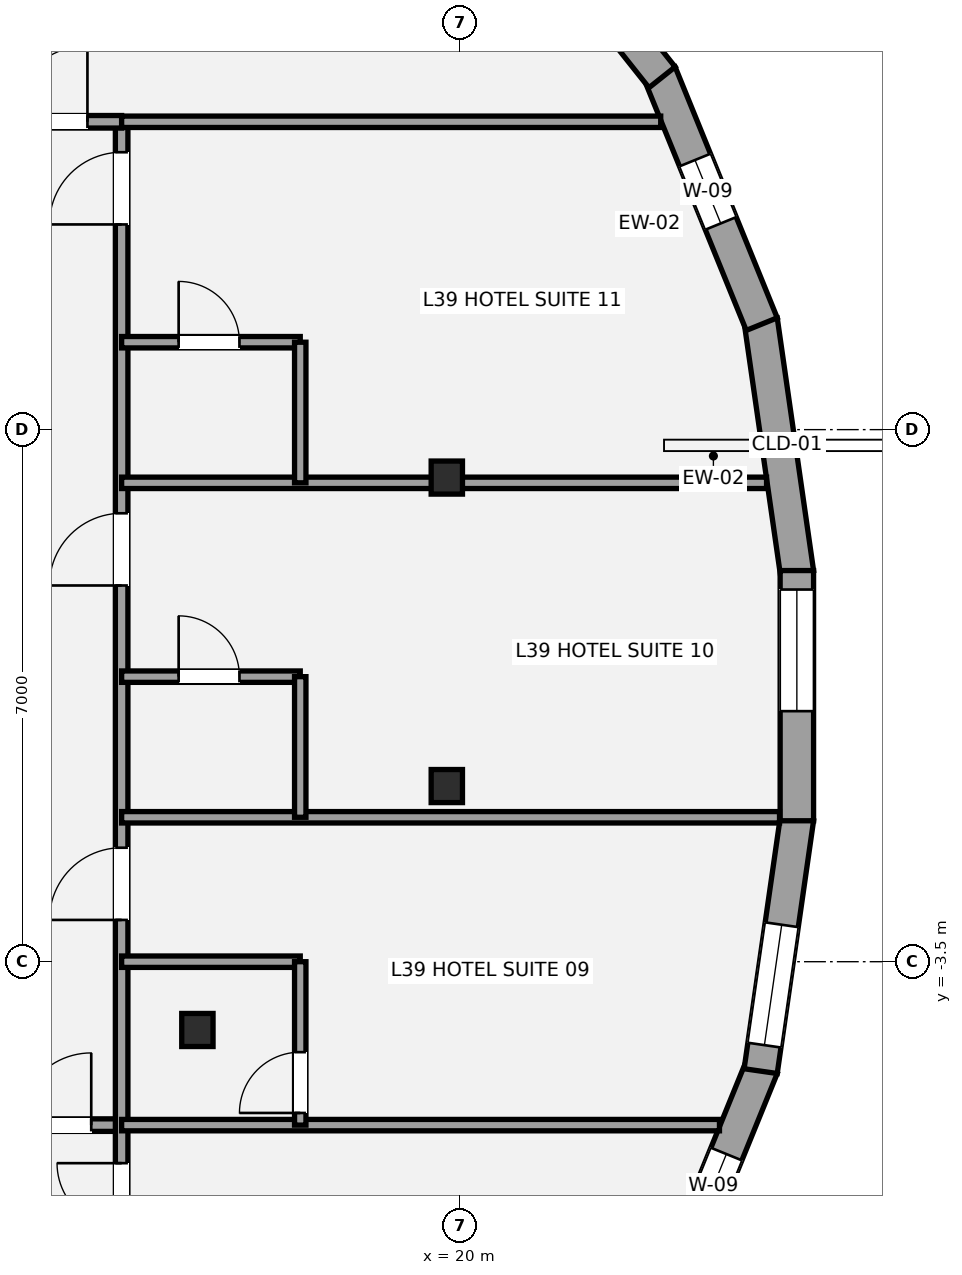
"""IFC4 building model, lengths in metres.
Left out: names, types, materials, properties, quantities, classifications, styles, units other than length and angle.
Written with IfcOpenShell. Run it as: python <this file> out.ifc"""

import sys

from ifc_helpers import new_model, si_unit, direction, frame, frame_2d, origin, origin_2d, place, context, subcontext, project, spatial, rectangle, i_section, extrude, element, fill, save


model = new_model("IFC4")
c1 = context("Model", 3, precision=1e-05, world=origin(), true_north=direction((0.0, 1.0)))
c2 = subcontext(c1, "Body", "Model", "MODEL_VIEW")
j1 = project(units=[si_unit("LENGTHUNIT", "METRE"), si_unit("PLANEANGLEUNIT", "RADIAN")], contexts=[c1])
p1 = place(None, origin())
s1 = spatial("IfcSite", under=j1, at=p1, CompositionType="ELEMENT")
p2 = place(p1, origin())
s2 = spatial("IfcBuilding", under=s1, at=p2, CompositionType="ELEMENT")
p3 = place(p2, frame((0.0, 0.0, 147.0)))
s3 = spatial("IfcBuildingStorey", under=s2, at=p3, CompositionType="ELEMENT", Elevation=147.0)
for number, where, z_axis, x_axis in (
    (1, (19.828, 2.869, 0.0), (0.0, 0.0, 1.0), (1.0, 0.0, 0.0)),
    (2, (16.547, -4.398, 0.0), (0.0, 0.0, 1.0), (1.0, 0.0, 0.0)),
    (3, (19.828, -1.189, 0.0), (0.0, 0.0, 1.0), (1.0, 0.0, 0.0)),
):
    element("IfcColumn", number, at=place(p3, frame(where, z_axis=z_axis, x_axis=x_axis)), inside=s3, PredefinedType="COLUMN", context=c2, shape_type="SweptSolid", body=[
        extrude(i_section(OverallWidth=0.412, OverallDepth=0.435, WebThickness=0.036, FlangeThickness=0.057, at=origin_2d()), origin(), (0.0, 0.0, 1.0), 3.2),
    ])
p4 = place(p3, frame((23.958, 4.94, 0.0), z_axis=(0.0, 0.0, 1.0), x_axis=(0.142296299692, -0.989824107149, 0.0)))
e4 = element("IfcWall", 4, at=p4, inside=s3, PredefinedType="STANDARD", context=c2, shape_type="SweptSolid", body=[
    extrude(rectangle(XDim=3.359, YDim=0.44, at=frame_2d((1.68, 0.0))), origin(), (0.0, 0.0, 1.0), 2.315),
])
p5 = place(p3, frame((22.629, 8.189, 0.0), z_axis=(0.0, 0.0, 1.0), x_axis=(0.376863872061, -0.926268655378, 0.0)))
e5 = element("IfcWall", 5, at=p5, inside=s3, PredefinedType="STANDARD", context=c2, shape_type="SweptSolid", body=[
    extrude(rectangle(XDim=3.564, YDim=0.44, at=frame_2d((1.782, 0.0))), origin(), (0.0, 0.0, 1.0), 2.315),
])
p6 = place(p5, frame((1.234, 0.0, 0.58)))
e6 = element("IfcOpeningElement", 6, at=p6, cuts=e5, PredefinedType="OPENING", context=c2, shape_type="SweptSolid", body=[
    extrude(rectangle(XDim=0.9, YDim=1.35, at=frame_2d((0.45, 0.675))), frame((0.0, 0.23, 0.0), z_axis=(0.0, -1.0, 0.0), x_axis=(1.0, 0.0, 0.0)), (0.0, 0.0, 1.0), 0.46),
])
p7 = place(p3, frame((20.22, 11.207, 0.0), z_axis=(0.0, 0.0, 1.0), x_axis=(0.622149266174, -0.782898646441, 0.0)))
e7 = element("IfcWall", 7, at=p7, inside=s3, PredefinedType="STANDARD", context=c2, shape_type="SweptSolid", body=[
    extrude(rectangle(XDim=3.923, YDim=0.44, at=frame_2d((1.961, 0.0))), origin(), (0.0, 0.0, 1.0), 2.315),
])
p8 = place(p7, frame((1.531, 0.0, 0.58)))
e8 = element("IfcOpeningElement", 8, at=p8, cuts=e7, PredefinedType="OPENING", context=c2, shape_type="SweptSolid", body=[
    extrude(rectangle(XDim=1.6, YDim=1.55, at=frame_2d((0.8, 0.775))), frame((0.0, 0.23, 0.0), z_axis=(0.0, -1.0, 0.0), x_axis=(1.0, 0.0, 0.0)), (0.0, 0.0, 1.0), 0.46),
])
p9 = place(p3, frame((23.972, -4.888, 0.0), z_axis=(0.0, 0.0, 1.0), x_axis=(-0.376863872061, -0.926268655378, 0.0)))
e9 = element("IfcWall", 9, at=p9, inside=s3, PredefinedType="STANDARD", context=c2, shape_type="SweptSolid", body=[
    extrude(rectangle(XDim=3.564, YDim=0.44, at=frame_2d((1.782, 0.0))), origin(), (0.0, 0.0, 1.0), 2.315),
])
p10 = place(p9, frame((1.234, 0.0, 0.58)))
e10 = element("IfcOpeningElement", 10, at=p10, cuts=e9, PredefinedType="OPENING", context=c2, shape_type="SweptSolid", body=[
    extrude(rectangle(XDim=0.9, YDim=1.35, at=frame_2d((0.45, 0.675))), frame((0.0, 0.23, 0.0), z_axis=(0.0, -1.0, 0.0), x_axis=(1.0, 0.0, 0.0)), (0.0, 0.0, 1.0), 0.46),
])
p11 = place(p3, frame((24.436, -1.615, 0.0), z_axis=(0.0, 0.0, 1.0), x_axis=(-0.142296299692, -0.989824107149, 0.0)))
e11 = element("IfcWall", 11, at=p11, inside=s3, PredefinedType="STANDARD", context=c2, shape_type="SweptSolid", body=[
    extrude(rectangle(XDim=3.359, YDim=0.44, at=frame_2d((1.68, 0.0))), origin(), (0.0, 0.0, 1.0), 2.315),
])
p12 = place(p11, frame((1.414, 0.0, 0.58)))
e12 = element("IfcOpeningElement", 12, at=p12, cuts=e11, PredefinedType="OPENING", context=c2, shape_type="SweptSolid", body=[
    extrude(rectangle(XDim=1.6, YDim=1.55, at=frame_2d((0.8, 0.775))), frame((0.0, 0.23, 0.0), z_axis=(0.0, -1.0, 0.0), x_axis=(1.0, 0.0, 0.0)), (0.0, 0.0, 1.0), 0.46),
])
p13 = place(p3, frame((24.434, 1.646, 0.0), z_axis=(0.0, 0.0, 1.0), x_axis=(0.0, -1.0, 0.0)))
e13 = element("IfcWall", 13, at=p13, inside=s3, PredefinedType="STANDARD", context=c2, shape_type="SweptSolid", body=[
    extrude(rectangle(XDim=3.292, YDim=0.44, at=frame_2d((1.646, 0.0))), origin(), (0.0, 0.0, 1.0), 2.315),
])
p14 = place(p13, frame((0.25, 0.0, 0.58)))
e14 = element("IfcOpeningElement", 14, at=p14, cuts=e13, PredefinedType="OPENING", context=c2, shape_type="SweptSolid", body=[
    extrude(rectangle(XDim=1.6, YDim=1.55, at=frame_2d((0.8, 0.775))), frame((0.0, 0.23, 0.0), z_axis=(0.0, -1.0, 0.0), x_axis=(1.0, 0.0, 0.0)), (0.0, 0.0, 1.0), 0.46),
])
p15 = place(p3, frame((-15.55, -5.65, 0.0), z_axis=(0.0, 0.0, 1.0), x_axis=(1.0, 0.0, 0.0)))
e15 = element("IfcWall", 15, at=p15, inside=s3, PredefinedType="PARTITIONING", context=c2, shape_type="SweptSolid", body=[
    extrude(rectangle(XDim=31.1, YDim=0.165, at=frame_2d((15.55, 0.0))), origin(), (0.0, 0.0, 1.0), 2.398),
])
p16 = place(p15, frame((4.6, 0.0, 0.0)))
e16 = element("IfcOpeningElement", 16, at=p16, cuts=e15, PredefinedType="OPENING", context=c2, shape_type="SweptSolid", body=[
    extrude(rectangle(XDim=0.95, YDim=2.15, at=frame_2d((0.475, 1.075))), frame((0.0, 0.093, 0.0), z_axis=(0.0, -1.0, 0.0), x_axis=(1.0, 0.0, 0.0)), (0.0, 0.0, 1.0), 0.185),
])
p17 = place(p15, frame((11.0, 0.0, 0.0)))
e17 = element("IfcOpeningElement", 17, at=p17, cuts=e15, PredefinedType="OPENING", context=c2, shape_type="SweptSolid", body=[
    extrude(rectangle(XDim=0.95, YDim=2.15, at=frame_2d((0.475, 1.075))), frame((0.0, 0.093, 0.0), z_axis=(0.0, -1.0, 0.0), x_axis=(1.0, 0.0, 0.0)), (0.0, 0.0, 1.0), 0.185),
])
p18 = place(p15, frame((17.4, 0.0, 0.0)))
e18 = element("IfcOpeningElement", 18, at=p18, cuts=e15, PredefinedType="OPENING", context=c2, shape_type="SweptSolid", body=[
    extrude(rectangle(XDim=0.95, YDim=2.15, at=frame_2d((0.475, 1.075))), frame((0.0, 0.093, 0.0), z_axis=(0.0, -1.0, 0.0), x_axis=(1.0, 0.0, 0.0)), (0.0, 0.0, 1.0), 0.185),
])
p19 = place(p15, frame((23.8, 0.0, 0.0)))
e19 = element("IfcOpeningElement", 19, at=p19, cuts=e15, PredefinedType="OPENING", context=c2, shape_type="SweptSolid", body=[
    extrude(rectangle(XDim=0.95, YDim=2.15, at=frame_2d((0.475, 1.075))), frame((0.0, 0.093, 0.0), z_axis=(0.0, -1.0, 0.0), x_axis=(1.0, 0.0, 0.0)), (0.0, 0.0, 1.0), 0.185),
])
p20 = place(p15, frame((29.75, 0.0, 0.0)))
e20 = element("IfcOpeningElement", 20, at=p20, cuts=e15, PredefinedType="OPENING", context=c2, shape_type="SweptSolid", body=[
    extrude(rectangle(XDim=0.95, YDim=2.15, at=frame_2d((0.475, 1.075))), frame((0.0, 0.093, 0.0), z_axis=(0.0, -1.0, 0.0), x_axis=(1.0, 0.0, 0.0)), (0.0, 0.0, 1.0), 0.185),
])
p21 = place(p3, frame((15.55, -13.778, 0.0), z_axis=(0.0, 0.0, 1.0), x_axis=(0.0, 1.0, 0.0)))
e21 = element("IfcWall", 21, at=p21, inside=s3, PredefinedType="PARTITIONING", context=c2, shape_type="SweptSolid", body=[
    extrude(rectangle(XDim=21.328, YDim=0.165, at=frame_2d((10.664, 0.0))), origin(), (0.0, 0.0, 1.0), 2.473),
])
p22 = place(p21, frame((6.777, 0.0, 0.0)))
e22 = element("IfcOpeningElement", 22, at=p22, cuts=e21, PredefinedType="OPENING", context=c2, shape_type="SweptSolid", body=[
    extrude(rectangle(XDim=0.85, YDim=2.1, at=frame_2d((0.425, 1.05))), frame((0.0, 0.093, 0.0), z_axis=(0.0, -1.0, 0.0), x_axis=(1.0, 0.0, 0.0)), (0.0, 0.0, 1.0), 0.185),
])
p23 = place(p21, frame((10.827, 0.0, 0.0)))
e23 = element("IfcOpeningElement", 23, at=p23, cuts=e21, PredefinedType="OPENING", context=c2, shape_type="SweptSolid", body=[
    extrude(rectangle(XDim=0.95, YDim=2.15, at=frame_2d((0.475, 1.075))), frame((0.0, 0.093, 0.0), z_axis=(0.0, -1.0, 0.0), x_axis=(1.0, 0.0, 0.0)), (0.0, 0.0, 1.0), 0.185),
])
p24 = place(p21, frame((15.227, 0.0, 0.0)))
e24 = element("IfcOpeningElement", 24, at=p24, cuts=e21, PredefinedType="OPENING", context=c2, shape_type="SweptSolid", body=[
    extrude(rectangle(XDim=0.95, YDim=2.15, at=frame_2d((0.475, 1.075))), frame((0.0, 0.093, 0.0), z_axis=(0.0, -1.0, 0.0), x_axis=(1.0, 0.0, 0.0)), (0.0, 0.0, 1.0), 0.185),
])
p25 = place(p21, frame((19.977, 0.0, 0.0)))
e25 = element("IfcOpeningElement", 25, at=p25, cuts=e21, PredefinedType="OPENING", context=c2, shape_type="SweptSolid", body=[
    extrude(rectangle(XDim=0.95, YDim=2.15, at=frame_2d((0.475, 1.075))), frame((0.0, 0.093, 0.0), z_axis=(0.0, -1.0, 0.0), x_axis=(1.0, 0.0, 0.0)), (0.0, 0.0, 1.0), 0.185),
])
p26 = place(p3, frame((13.8, 7.55, 0.0), z_axis=(0.0, 0.0, 1.0), x_axis=(1.0, 0.0, 0.0)))
e26 = element("IfcWall", 26, at=p26, inside=s3, PredefinedType="PARTITIONING", context=c2, shape_type="SweptSolid", body=[
    extrude(rectangle(XDim=1.75, YDim=0.165, at=frame_2d((0.875, 0.0))), origin(), (0.0, 0.0, 1.0), 2.473),
])
p27 = place(p26, frame((0.3, 0.0, 0.0)))
e27 = element("IfcOpeningElement", 27, at=p27, cuts=e26, PredefinedType="OPENING", context=c2, shape_type="SweptSolid", body=[
    extrude(rectangle(XDim=1.0, YDim=2.15, at=frame_2d((0.5, 1.075))), frame((0.0, 0.093, 0.0), z_axis=(0.0, -1.0, 0.0), x_axis=(1.0, 0.0, 0.0)), (0.0, 0.0, 1.0), 0.185),
])
p28 = place(p3, frame((15.55, 7.55, 0.0), z_axis=(0.0, 0.0, 1.0), x_axis=(1.0, 0.0, 0.0)))
e28 = element("IfcWall", 28, at=p28, inside=s3, PredefinedType="PLUMBINGWALL", context=c2, shape_type="SweptSolid", body=[
    extrude(rectangle(XDim=7.093, YDim=0.15, at=frame_2d((3.546, 0.0))), origin(), (0.0, 0.0, 1.0), 2.473),
])
p29 = place(p3, frame((15.55, -5.65, 0.0), z_axis=(0.0, 0.0, 1.0), x_axis=(1.0, 0.0, 0.0)))
e29 = element("IfcWall", 29, at=p29, inside=s3, PredefinedType="PLUMBINGWALL", context=c2, shape_type="SweptSolid", body=[
    extrude(rectangle(XDim=7.866, YDim=0.15, at=frame_2d((3.933, 0.0))), origin(), (0.0, 0.0, 1.0), 2.473),
])
p30 = place(p3, frame((15.55, -1.6, 0.0), z_axis=(0.0, 0.0, 1.0), x_axis=(1.0, 0.0, 0.0)))
e30 = element("IfcWall", 30, at=p30, inside=s3, PredefinedType="PLUMBINGWALL", context=c2, shape_type="SweptSolid", body=[
    extrude(rectangle(XDim=8.656, YDim=0.15, at=frame_2d((4.328, 0.0))), origin(), (0.0, 0.0, 1.0), 2.398),
])
p31 = place(p3, frame((15.55, 2.8, 0.0), z_axis=(0.0, 0.0, 1.0), x_axis=(1.0, 0.0, 0.0)))
e31 = element("IfcWall", 31, at=p31, inside=s3, PredefinedType="PLUMBINGWALL", context=c2, shape_type="SweptSolid", body=[
    extrude(rectangle(XDim=8.485, YDim=0.15, at=frame_2d((4.243, 0.0))), origin(), (0.0, 0.0, 1.0), 2.473),
])
p32 = place(p3, frame((15.55, -3.5, 0.0), z_axis=(0.0, 0.0, 1.0), x_axis=(1.0, 0.0, 0.0)))
e32 = element("IfcWall", 32, at=p32, inside=s3, PredefinedType="PLUMBINGWALL", context=c2, shape_type="SweptSolid", body=[
    extrude(rectangle(XDim=2.35, YDim=0.15, at=frame_2d((1.175, 0.0))), origin(), (0.0, 0.0, 1.0), 2.398),
])
p33 = place(p3, frame((17.9, -5.65, 0.0), z_axis=(0.0, 0.0, 1.0), x_axis=(0.0, 1.0, 0.0)))
e33 = element("IfcWall", 33, at=p33, inside=s3, PredefinedType="PLUMBINGWALL", context=c2, shape_type="SweptSolid", body=[
    extrude(rectangle(XDim=2.15, YDim=0.15, at=frame_2d((1.075, 0.0))), origin(), (0.0, 0.0, 1.0), 2.473),
])
p34 = place(p33, frame((0.16, 0.0, 0.0)))
e34 = element("IfcOpeningElement", 34, at=p34, cuts=e33, PredefinedType="OPENING", context=c2, shape_type="SweptSolid", body=[
    extrude(rectangle(XDim=0.8, YDim=2.1, at=frame_2d((0.4, 1.05))), frame((0.0, 0.085, 0.0), z_axis=(0.0, -1.0, 0.0), x_axis=(1.0, 0.0, 0.0)), (0.0, 0.0, 1.0), 0.17),
])
p35 = place(p3, frame((15.55, 0.25, 0.0), z_axis=(0.0, 0.0, 1.0), x_axis=(1.0, 0.0, 0.0)))
e35 = element("IfcWall", 35, at=p35, inside=s3, PredefinedType="PLUMBINGWALL", context=c2, shape_type="SweptSolid", body=[
    extrude(rectangle(XDim=2.35, YDim=0.15, at=frame_2d((1.175, 0.0))), origin(), (0.0, 0.0, 1.0), 2.473),
])
p36 = place(p35, frame((0.75, 0.0, 0.0)))
e36 = element("IfcOpeningElement", 36, at=p36, cuts=e35, PredefinedType="OPENING", context=c2, shape_type="SweptSolid", body=[
    extrude(rectangle(XDim=0.8, YDim=2.1, at=frame_2d((0.4, 1.05))), frame((0.0, 0.085, 0.0), z_axis=(0.0, -1.0, 0.0), x_axis=(1.0, 0.0, 0.0)), (0.0, 0.0, 1.0), 0.17),
])
p37 = place(p3, frame((17.9, -1.6, 0.0), z_axis=(0.0, 0.0, 1.0), x_axis=(0.0, 1.0, 0.0)))
e37 = element("IfcWall", 37, at=p37, inside=s3, PredefinedType="PLUMBINGWALL", context=c2, shape_type="SweptSolid", body=[
    extrude(rectangle(XDim=1.85, YDim=0.15, at=frame_2d((0.925, 0.0))), origin(), (0.0, 0.0, 1.0), 3.02),
])
p38 = place(p3, frame((15.55, 4.65, 0.0), z_axis=(0.0, 0.0, 1.0), x_axis=(1.0, 0.0, 0.0)))
e38 = element("IfcWall", 38, at=p38, inside=s3, PredefinedType="PLUMBINGWALL", context=c2, shape_type="SweptSolid", body=[
    extrude(rectangle(XDim=2.35, YDim=0.15, at=frame_2d((1.175, 0.0))), origin(), (0.0, 0.0, 1.0), 2.473),
])
p39 = place(p38, frame((0.75, 0.0, 0.0)))
e39 = element("IfcOpeningElement", 39, at=p39, cuts=e38, PredefinedType="OPENING", context=c2, shape_type="SweptSolid", body=[
    extrude(rectangle(XDim=0.8, YDim=2.1, at=frame_2d((0.4, 1.05))), frame((0.0, 0.085, 0.0), z_axis=(0.0, -1.0, 0.0), x_axis=(1.0, 0.0, 0.0)), (0.0, 0.0, 1.0), 0.17),
])
p40 = place(p3, frame((17.9, 2.8, 0.0), z_axis=(0.0, 0.0, 1.0), x_axis=(0.0, 1.0, 0.0)))
e40 = element("IfcWall", 40, at=p40, inside=s3, PredefinedType="PLUMBINGWALL", context=c2, shape_type="SweptSolid", body=[
    extrude(rectangle(XDim=1.85, YDim=0.15, at=frame_2d((0.925, 0.0))), origin(), (0.0, 0.0, 1.0), 3.02),
])
p41 = place(p6, origin())
e41 = element("IfcWindow", 41, at=p41, inside=s3, PartitioningType="SINGLE_PANEL", PredefinedType="WINDOW", context=c2, shape_type="SweptSolid", body=[
    extrude(rectangle(XDim=0.9, YDim=1.35, at=frame_2d((0.45, 0.675))), frame((0.0, -0.01, 0.0), z_axis=(0.0, -1.0, 0.0), x_axis=(1.0, 0.0, 0.0)), (0.0, 0.0, 1.0), 0.06),
])
fill(e6, e41)
p42 = place(p10, origin())
e42 = element("IfcWindow", 42, at=p42, inside=s3, PartitioningType="SINGLE_PANEL", PredefinedType="WINDOW", context=c2, shape_type="SweptSolid", body=[
    extrude(rectangle(XDim=0.9, YDim=1.35, at=frame_2d((0.45, 0.675))), frame((0.0, -0.01, 0.0), z_axis=(0.0, -1.0, 0.0), x_axis=(1.0, 0.0, 0.0)), (0.0, 0.0, 1.0), 0.06),
])
fill(e10, e42)
p43 = place(p12, origin())
e43 = element("IfcWindow", 43, at=p43, inside=s3, PartitioningType="SINGLE_PANEL", PredefinedType="WINDOW", context=c2, shape_type="SweptSolid", body=[
    extrude(rectangle(XDim=1.6, YDim=1.55, at=frame_2d((0.8, 0.775))), frame((0.0, -0.01, 0.0), z_axis=(0.0, -1.0, 0.0), x_axis=(1.0, 0.0, 0.0)), (0.0, 0.0, 1.0), 0.06),
])
fill(e12, e43)
p44 = place(p14, origin())
e44 = element("IfcWindow", 44, at=p44, inside=s3, PartitioningType="SINGLE_PANEL", PredefinedType="WINDOW", context=c2, shape_type="SweptSolid", body=[
    extrude(rectangle(XDim=1.6, YDim=1.55, at=frame_2d((0.8, 0.775))), frame((0.0, -0.01, 0.0), z_axis=(0.0, -1.0, 0.0), x_axis=(1.0, 0.0, 0.0)), (0.0, 0.0, 1.0), 0.06),
])
fill(e14, e44)
p45 = place(p27, origin())
e45 = element("IfcDoor", 45, at=p45, inside=s3, OperationType="SINGLE_SWING_RIGHT", PredefinedType="DOOR", context=c2, shape_type="SweptSolid", body=[
    extrude(rectangle(XDim=1.0, YDim=2.15, at=frame_2d((0.5, 1.075))), frame((0.0, 0.025, 0.0), z_axis=(0.0, -1.0, 0.0), x_axis=(1.0, 0.0, 0.0)), (0.0, 0.0, 1.0), 0.05),
])
fill(e27, e45)
p46 = place(p22, origin())
e46 = element("IfcDoor", 46, at=p46, inside=s3, OperationType="SINGLE_SWING_RIGHT", PredefinedType="DOOR", context=c2, shape_type="SweptSolid", body=[
    extrude(rectangle(XDim=0.85, YDim=2.1, at=frame_2d((0.425, 1.05))), frame((0.0, 0.025, 0.0), z_axis=(0.0, -1.0, 0.0), x_axis=(1.0, 0.0, 0.0)), (0.0, 0.0, 1.0), 0.05),
])
fill(e22, e46)
p47 = place(p20, origin())
e47 = element("IfcDoor", 47, at=p47, inside=s3, OperationType="SINGLE_SWING_RIGHT", PredefinedType="DOOR", context=c2, shape_type="SweptSolid", body=[
    extrude(rectangle(XDim=0.95, YDim=2.15, at=frame_2d((0.475, 1.075))), frame((0.0, 0.025, 0.0), z_axis=(0.0, -1.0, 0.0), x_axis=(1.0, 0.0, 0.0)), (0.0, 0.0, 1.0), 0.05),
])
fill(e20, e47)
p48 = place(p23, origin())
e48 = element("IfcDoor", 48, at=p48, inside=s3, OperationType="SINGLE_SWING_LEFT", PredefinedType="DOOR", context=c2, shape_type="SweptSolid", body=[
    extrude(rectangle(XDim=0.95, YDim=2.15, at=frame_2d((0.475, 1.075))), frame((0.0, 0.025, 0.0), z_axis=(0.0, -1.0, 0.0), x_axis=(1.0, 0.0, 0.0)), (0.0, 0.0, 1.0), 0.05),
])
fill(e23, e48)
p49 = place(p34, origin())
e49 = element("IfcDoor", 49, at=p49, inside=s3, OperationType="SINGLE_SWING_LEFT", PredefinedType="DOOR", context=c2, shape_type="SweptSolid", body=[
    extrude(rectangle(XDim=0.8, YDim=2.1, at=frame_2d((0.4, 1.05))), frame((0.0, 0.025, 0.0), z_axis=(0.0, -1.0, 0.0), x_axis=(1.0, 0.0, 0.0)), (0.0, 0.0, 1.0), 0.05),
])
fill(e34, e49)
p50 = place(p24, origin())
e50 = element("IfcDoor", 50, at=p50, inside=s3, OperationType="SINGLE_SWING_LEFT", PredefinedType="DOOR", context=c2, shape_type="SweptSolid", body=[
    extrude(rectangle(XDim=0.95, YDim=2.15, at=frame_2d((0.475, 1.075))), frame((0.0, 0.025, 0.0), z_axis=(0.0, -1.0, 0.0), x_axis=(1.0, 0.0, 0.0)), (0.0, 0.0, 1.0), 0.05),
])
fill(e24, e50)
p51 = place(p36, origin())
e51 = element("IfcDoor", 51, at=p51, inside=s3, OperationType="SINGLE_SWING_LEFT", PredefinedType="DOOR", context=c2, shape_type="SweptSolid", body=[
    extrude(rectangle(XDim=0.8, YDim=2.1, at=frame_2d((0.4, 1.05))), frame((0.0, 0.025, 0.0), z_axis=(0.0, -1.0, 0.0), x_axis=(1.0, 0.0, 0.0)), (0.0, 0.0, 1.0), 0.05),
])
fill(e36, e51)
p52 = place(p25, origin())
e52 = element("IfcDoor", 52, at=p52, inside=s3, OperationType="SINGLE_SWING_LEFT", PredefinedType="DOOR", context=c2, shape_type="SweptSolid", body=[
    extrude(rectangle(XDim=0.95, YDim=2.15, at=frame_2d((0.475, 1.075))), frame((0.0, 0.025, 0.0), z_axis=(0.0, -1.0, 0.0), x_axis=(1.0, 0.0, 0.0)), (0.0, 0.0, 1.0), 0.05),
])
fill(e25, e52)
p53 = place(p39, origin())
e53 = element("IfcDoor", 53, at=p53, inside=s3, OperationType="SINGLE_SWING_LEFT", PredefinedType="DOOR", context=c2, shape_type="SweptSolid", body=[
    extrude(rectangle(XDim=0.8, YDim=2.1, at=frame_2d((0.4, 1.05))), frame((0.0, 0.025, 0.0), z_axis=(0.0, -1.0, 0.0), x_axis=(1.0, 0.0, 0.0)), (0.0, 0.0, 1.0), 0.05),
])
fill(e39, e53)
save(model, sys.argv[1])
